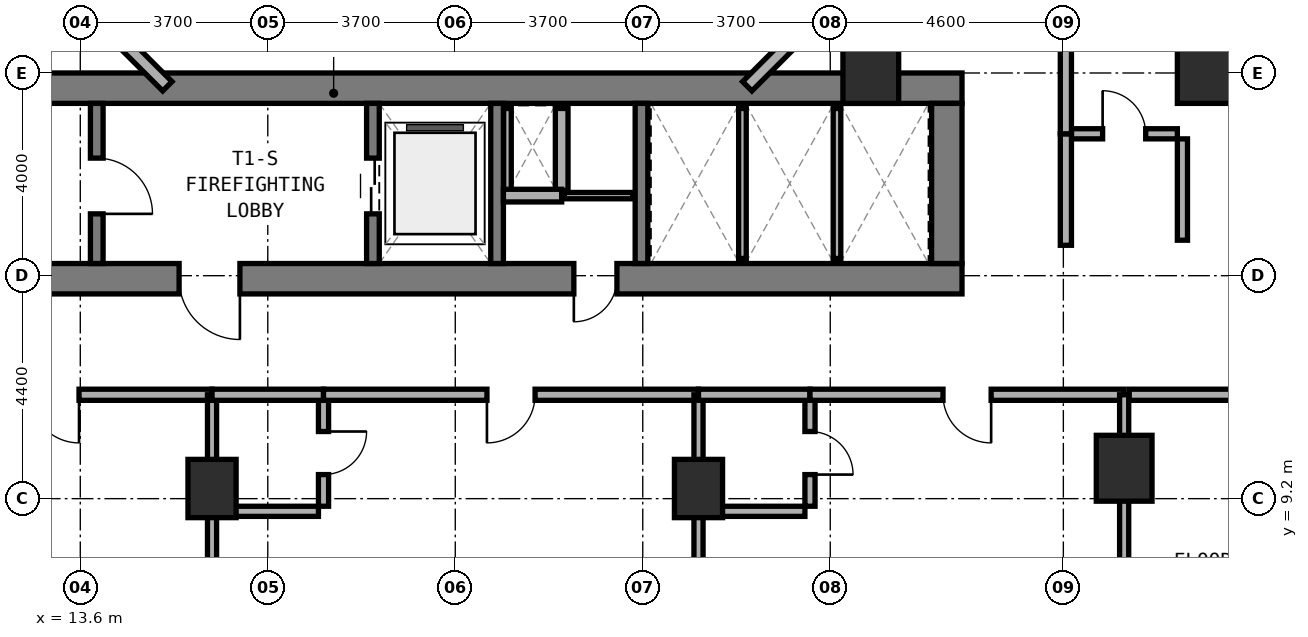
"""IFC4 building model, lengths in metres.
Left out: names, types, materials, properties, quantities, classifications, styles, units other than length and angle.
Written with IfcOpenShell. Run it as: python <this file> out.ifc"""

import sys

from ifc_helpers import new_model, si_unit, direction, frame, frame_2d, origin, origin_2d, place, context, subcontext, project, spatial, rectangle, extrude, element, fill, save


model = new_model("IFC4")
c1 = context("Model", 3, precision=1e-05, world=origin(), true_north=direction((0.0, 1.0)))
c2 = subcontext(c1, "Body", "Model", "MODEL_VIEW")
j1 = project(units=[si_unit("LENGTHUNIT", "METRE"), si_unit("PLANEANGLEUNIT", "RADIAN")], contexts=[c1])
p1 = place(None, origin())
s1 = spatial("IfcSite", under=j1, at=p1, CompositionType="ELEMENT")
p2 = place(p1, origin())
s2 = spatial("IfcBuilding", under=s1, at=p2, CompositionType="ELEMENT")
p3 = place(p2, frame((0.0, 0.0, 31.0)))
s3 = spatial("IfcBuildingStorey", under=s2, at=p3, CompositionType="ELEMENT", Elevation=31.0)
p4 = place(p3, frame((6.2, 13.54, 0.0), z_axis=(0.0, 0.0, 1.0), x_axis=(1.0, 0.0, 0.0)))
e1 = element("IfcWall", 1, at=p4, inside=s3, PredefinedType="SHEAR", context=c2, shape_type="SweptSolid", body=[
    extrude(rectangle(XDim=24.8, YDim=0.6, at=frame_2d((12.4, 0.0))), origin(), (0.0, 0.0, 1.0), 3.5),
])
p5 = place(p4, frame((9.35, 0.0, 0.0)))
e2 = element("IfcOpeningElement", 2, at=p5, cuts=e1, PredefinedType="OPENING", context=c2, shape_type="SweptSolid", body=[
    extrude(rectangle(XDim=1.2, YDim=2.15, at=frame_2d((0.6, 1.075))), frame((0.0, 0.31, 0.0), z_axis=(0.0, -1.0, 0.0), x_axis=(1.0, 0.0, 0.0)), (0.0, 0.0, 1.0), 0.62),
])
p6 = place(p4, frame((17.14, 0.0, 0.0)))
e3 = element("IfcOpeningElement", 3, at=p6, cuts=e1, PredefinedType="OPENING", context=c2, shape_type="SweptSolid", body=[
    extrude(rectangle(XDim=0.85, YDim=2.1, at=frame_2d((0.425, 1.05))), frame((0.0, 0.31, 0.0), z_axis=(0.0, -1.0, 0.0), x_axis=(1.0, 0.0, 0.0)), (0.0, 0.0, 1.0), 0.62),
])
p7 = place(p3, frame((6.2, 17.3, 0.0), z_axis=(0.0, 0.0, 1.0), x_axis=(1.0, 0.0, 0.0)))
e4 = element("IfcWall", 4, at=p7, inside=s3, PredefinedType="SHEAR", context=c2, shape_type="SweptSolid", body=[
    extrude(rectangle(XDim=24.8, YDim=0.6, at=frame_2d((12.4, 0.0))), origin(), (0.0, 0.0, 1.0), 3.5),
])
p8 = place(p3, frame((30.7, 13.84, 0.0), z_axis=(0.0, 0.0, 1.0), x_axis=(0.0, 1.0, 0.0)))
e5 = element("IfcWall", 5, at=p8, inside=s3, PredefinedType="SHEAR", context=c2, shape_type="SweptSolid", body=[
    extrude(rectangle(XDim=3.16, YDim=0.6, at=frame_2d((1.58, 0.0))), origin(), (0.0, 0.0, 1.0), 3.5),
])
p9 = place(p3, frame((13.925, 13.84, 0.0), z_axis=(0.0, 0.0, 1.0), x_axis=(0.0, 1.0, 0.0)))
e6 = element("IfcWall", 6, at=p9, inside=s3, PredefinedType="STANDARD", context=c2, shape_type="SweptSolid", body=[
    extrude(rectangle(XDim=3.16, YDim=0.25, at=frame_2d((1.58, 0.0))), origin(), (0.0, 0.0, 1.0), 3.22),
])
p10 = place(p9, frame((0.98, 0.0, 0.0)))
e7 = element("IfcOpeningElement", 7, at=p10, cuts=e6, PredefinedType="OPENING", context=c2, shape_type="SweptSolid", body=[
    extrude(rectangle(XDim=1.1, YDim=2.15, at=frame_2d((0.55, 1.075))), frame((0.0, 0.135, 0.0), z_axis=(0.0, -1.0, 0.0), x_axis=(1.0, 0.0, 0.0)), (0.0, 0.0, 1.0), 0.27),
])
p11 = place(p3, frame((19.375, 13.84, 0.0), z_axis=(0.0, 0.0, 1.0), x_axis=(0.0, 1.0, 0.0)))
e8 = element("IfcWall", 8, at=p11, inside=s3, PredefinedType="STANDARD", context=c2, shape_type="SweptSolid", body=[
    extrude(rectangle(XDim=3.16, YDim=0.25, at=frame_2d((1.58, 0.0))), origin(), (0.0, 0.0, 1.0), 3.22),
])
p12 = place(p11, frame((0.98, 0.0, 0.0)))
e9 = element("IfcOpeningElement", 9, at=p12, cuts=e8, PredefinedType="OPENING", context=c2, shape_type="SweptSolid", body=[
    extrude(rectangle(XDim=1.1, YDim=2.15, at=frame_2d((0.55, 1.075))), frame((0.0, 0.135, 0.0), z_axis=(0.0, -1.0, 0.0), x_axis=(1.0, 0.0, 0.0)), (0.0, 0.0, 1.0), 0.27),
])
for number, where, z_axis, x_axis in (
    (10, (21.825, 13.84, 0.0), (0.0, 0.0, 1.0), (0.0, 1.0, 0.0)),
    (11, (24.675, 13.84, 0.0), (0.0, 0.0, 1.0), (0.0, 1.0, 0.0)),
):
    element("IfcWall", number, at=place(p3, frame(where, z_axis=z_axis, x_axis=x_axis)), inside=s3, PredefinedType="STANDARD", context=c2, shape_type="SweptSolid", body=[
        extrude(rectangle(XDim=3.16, YDim=0.25, at=frame_2d((1.58, 0.0))), origin(), (0.0, 0.0, 1.0), 3.22),
    ])
for number, where, z_axis, x_axis in (
    (12, (16.2, 9.4, 0.0), (0.0, 0.0, 1.0), (1.0, 0.0, 0.0)),
    (13, (25.8, 9.4, 0.0), (0.0, 0.0, 1.0), (1.0, 0.0, 0.0)),
):
    element("IfcColumn", number, at=place(p3, frame(where, z_axis=z_axis, x_axis=x_axis)), inside=s3, PredefinedType="COLUMN", context=c2, shape_type="SweptSolid", body=[
        extrude(rectangle(XDim=0.95, YDim=1.15, at=origin_2d()), origin(), (0.0, 0.0, 1.0), 3.5),
    ])
for number, where, z_axis, x_axis in (
    (14, (34.2, 9.8, 0.0), (0.0, 0.0, 1.0), (1.0, 0.0, 0.0)),
    (15, (35.8, 17.65, 0.0), (0.0, 0.0, 1.0), (1.0, 0.0, 0.0)),
    (16, (29.2, 17.65, 0.0), (0.0, 0.0, 1.0), (1.0, 0.0, 0.0)),
):
    element("IfcColumn", number, at=place(p3, frame(where, z_axis=z_axis, x_axis=x_axis)), inside=s3, PredefinedType="COLUMN", context=c2, shape_type="SweptSolid", body=[
        extrude(rectangle(XDim=1.1, YDim=1.3, at=origin_2d()), origin(), (0.0, 0.0, 1.0), 3.5),
    ])
p13 = place(p3, frame((26.762, 17.338, 0.0), z_axis=(0.0, 0.0, 1.0), x_axis=(0.707059717605, 0.707153841636, 0.0)))
e17 = element("IfcWall", 17, at=p13, inside=s3, PredefinedType="STANDARD", context=c2, shape_type="SweptSolid", body=[
    extrude(rectangle(XDim=2.594, YDim=0.26, at=frame_2d((1.297, 0.0))), origin(), (0.0, 0.0, 1.0), 3.22),
])
p14 = place(p3, frame((13.484, 19.172, 0.0), z_axis=(0.0, 0.0, 1.0), x_axis=(0.707106781187, -0.707106781187, 0.0)))
e18 = element("IfcWall", 18, at=p14, inside=s3, PredefinedType="STANDARD", context=c2, shape_type="SweptSolid", body=[
    extrude(rectangle(XDim=2.594, YDim=0.26, at=frame_2d((1.297, 0.0))), origin(), (0.0, 0.0, 1.0), 3.22),
])
p15 = place(p3, frame((22.03, 15.28, 0.0), z_axis=(0.0, 0.0, 1.0), x_axis=(0.0, 1.0, 0.0)))
e19 = element("IfcWall", 19, at=p15, inside=s3, PredefinedType="PARTITIONING", context=c2, shape_type="SweptSolid", body=[
    extrude(rectangle(XDim=1.62, YDim=0.15, at=frame_2d((0.81, 0.0))), origin(), (0.0, 0.0, 1.0), 3.22),
])
p16 = place(p3, frame((23.1, 15.28, 0.0), z_axis=(0.0, 0.0, 1.0), x_axis=(0.0, 1.0, 0.0)))
e20 = element("IfcWall", 20, at=p16, inside=s3, PredefinedType="SOLIDWALL", context=c2, shape_type="SweptSolid", body=[
    extrude(rectangle(XDim=1.62, YDim=0.25, at=frame_2d((0.81, 0.0))), origin(), (0.0, 0.0, 1.0), 3.22),
])
p17 = place(p3, frame((21.95, 15.18, 0.0), z_axis=(0.0, 0.0, 1.0), x_axis=(1.0, 0.0, 0.0)))
e21 = element("IfcWall", 21, at=p17, inside=s3, PredefinedType="SOLIDWALL", context=c2, shape_type="SweptSolid", body=[
    extrude(rectangle(XDim=1.15, YDim=0.25, at=frame_2d((0.575, 0.0))), origin(), (0.0, 0.0, 1.0), 3.22),
])
p18 = place(p3, frame((23.15, 15.18, 0.0), z_axis=(0.0, 0.0, 1.0), x_axis=(1.0, 0.0, 0.0)))
e22 = element("IfcWall", 22, at=p18, inside=s3, PredefinedType="PARTITIONING", context=c2, shape_type="SweptSolid", body=[
    extrude(rectangle(XDim=1.35, YDim=0.125, at=frame_2d((0.675, 0.0))), origin(), (0.0, 0.0, 1.0), 3.22),
])
p19 = place(p3, frame((26.667, 13.94, 0.0), z_axis=(0.0, 0.0, 1.0), x_axis=(0.0, 1.0, 0.0)))
e23 = element("IfcWall", 23, at=p19, inside=s3, PredefinedType="PARTITIONING", context=c2, shape_type="SweptSolid", body=[
    extrude(rectangle(XDim=2.96, YDim=0.15, at=frame_2d((1.48, 0.0))), origin(), (0.0, 0.0, 1.0), 3.22),
])
p20 = place(p3, frame((28.533, 13.94, 0.0), z_axis=(0.0, 0.0, 1.0), x_axis=(0.0, 1.0, 0.0)))
e24 = element("IfcWall", 24, at=p20, inside=s3, PredefinedType="PARTITIONING", context=c2, shape_type="SweptSolid", body=[
    extrude(rectangle(XDim=2.96, YDim=0.15, at=frame_2d((1.48, 0.0))), origin(), (0.0, 0.0, 1.0), 2.395),
])
p21 = place(p3, frame((10.0, 11.25, 0.0), z_axis=(0.0, 0.0, 1.0), x_axis=(1.0, 0.0, 0.0)))
e25 = element("IfcWall", 25, at=p21, inside=s3, PredefinedType="SOLIDWALL", context=c2, shape_type="SweptSolid", body=[
    extrude(rectangle(XDim=6.2, YDim=0.22, at=frame_2d((3.1, 0.0))), origin(), (0.0, 0.0, 1.0), 2.395),
])
p22 = place(p21, frame((2.625, 0.0, 0.0)))
e26 = element("IfcOpeningElement", 26, at=p22, cuts=e25, PredefinedType="OPENING", context=c2, shape_type="SweptSolid", body=[
    extrude(rectangle(XDim=0.95, YDim=2.1, at=frame_2d((0.475, 1.05))), frame((0.0, 0.12, 0.0), z_axis=(0.0, -1.0, 0.0), x_axis=(1.0, 0.0, 0.0)), (0.0, 0.0, 1.0), 0.24),
])
p23 = place(p3, frame((16.2, 3.06, 0.0), z_axis=(0.0, 0.0, 1.0), x_axis=(0.0, 1.0, 0.0)))
e27 = element("IfcWall", 27, at=p23, inside=s3, PredefinedType="SOLIDWALL", context=c2, shape_type="SweptSolid", body=[
    extrude(rectangle(XDim=8.19, YDim=0.18, at=frame_2d((4.095, 0.0))), origin(), (0.0, 0.0, 1.0), 2.395),
])
p24 = place(p3, frame((18.4, 9.05, 0.0), z_axis=(0.0, 0.0, 1.0), x_axis=(0.0, 1.0, 0.0)))
e28 = element("IfcWall", 28, at=p24, inside=s3, PredefinedType="PLUMBINGWALL", context=c2, shape_type="SweptSolid", body=[
    extrude(rectangle(XDim=2.1, YDim=0.2, at=frame_2d((1.05, 0.0))), origin(), (0.0, 0.0, 1.0), 2.745),
])
p25 = place(p24, frame((0.625, 0.0, 0.0)))
e29 = element("IfcOpeningElement", 29, at=p25, cuts=e28, PredefinedType="OPENING", context=c2, shape_type="SweptSolid", body=[
    extrude(rectangle(XDim=0.85, YDim=2.1, at=frame_2d((0.425, 1.05))), frame((0.0, 0.11, 0.0), z_axis=(0.0, -1.0, 0.0), x_axis=(1.0, 0.0, 0.0)), (0.0, 0.0, 1.0), 0.22),
])
p26 = place(p3, frame((16.3, 8.95, 0.0), z_axis=(0.0, 0.0, 1.0), x_axis=(1.0, 0.0, 0.0)))
e30 = element("IfcWall", 30, at=p26, inside=s3, PredefinedType="PLUMBINGWALL", context=c2, shape_type="SweptSolid", body=[
    extrude(rectangle(XDim=2.0, YDim=0.2, at=frame_2d((1.0, 0.0))), origin(), (0.0, 0.0, 1.0), 3.22),
])
p27 = place(p3, frame((16.2, 11.25, 0.0), z_axis=(0.0, 0.0, 1.0), x_axis=(1.0, 0.0, 0.0)))
e31 = element("IfcWall", 31, at=p27, inside=s3, PredefinedType="SOLIDWALL", context=c2, shape_type="SweptSolid", body=[
    extrude(rectangle(XDim=2.2, YDim=0.22, at=frame_2d((1.1, 0.0))), origin(), (0.0, 0.0, 1.0), 2.395),
])
p28 = place(p3, frame((18.4, 11.25, 0.0), z_axis=(0.0, 0.0, 1.0), x_axis=(1.0, 0.0, 0.0)))
e32 = element("IfcWall", 32, at=p28, inside=s3, PredefinedType="SOLIDWALL", context=c2, shape_type="SweptSolid", body=[
    extrude(rectangle(XDim=7.4, YDim=0.22, at=frame_2d((3.7, 0.0))), origin(), (0.0, 0.0, 1.0), 2.395),
])
p29 = place(p28, frame((3.225, 0.0, 0.0)))
e33 = element("IfcOpeningElement", 33, at=p29, cuts=e32, PredefinedType="OPENING", context=c2, shape_type="SweptSolid", body=[
    extrude(rectangle(XDim=0.95, YDim=2.1, at=frame_2d((0.475, 1.05))), frame((0.0, 0.12, 0.0), z_axis=(0.0, -1.0, 0.0), x_axis=(1.0, 0.0, 0.0)), (0.0, 0.0, 1.0), 0.24),
])
p30 = place(p3, frame((25.8, 3.06, 0.0), z_axis=(0.0, 0.0, 1.0), x_axis=(0.0, 1.0, 0.0)))
e34 = element("IfcWall", 34, at=p30, inside=s3, PredefinedType="SOLIDWALL", context=c2, shape_type="SweptSolid", body=[
    extrude(rectangle(XDim=8.19, YDim=0.18, at=frame_2d((4.095, 0.0))), origin(), (0.0, 0.0, 1.0), 2.395),
])
p31 = place(p3, frame((28.0, 9.05, 0.0), z_axis=(0.0, 0.0, 1.0), x_axis=(0.0, 1.0, 0.0)))
e35 = element("IfcWall", 35, at=p31, inside=s3, PredefinedType="PLUMBINGWALL", context=c2, shape_type="SweptSolid", body=[
    extrude(rectangle(XDim=2.1, YDim=0.2, at=frame_2d((1.05, 0.0))), origin(), (0.0, 0.0, 1.0), 2.745),
])
p32 = place(p31, frame((0.625, 0.0, 0.0)))
e36 = element("IfcOpeningElement", 36, at=p32, cuts=e35, PredefinedType="OPENING", context=c2, shape_type="SweptSolid", body=[
    extrude(rectangle(XDim=0.85, YDim=2.1, at=frame_2d((0.425, 1.05))), frame((0.0, 0.11, 0.0), z_axis=(0.0, -1.0, 0.0), x_axis=(1.0, 0.0, 0.0)), (0.0, 0.0, 1.0), 0.22),
])
p33 = place(p3, frame((25.9, 8.95, 0.0), z_axis=(0.0, 0.0, 1.0), x_axis=(1.0, 0.0, 0.0)))
e37 = element("IfcWall", 37, at=p33, inside=s3, PredefinedType="PLUMBINGWALL", context=c2, shape_type="SweptSolid", body=[
    extrude(rectangle(XDim=2.0, YDim=0.2, at=frame_2d((1.0, 0.0))), origin(), (0.0, 0.0, 1.0), 3.22),
])
p34 = place(p3, frame((25.8, 11.25, 0.0), z_axis=(0.0, 0.0, 1.0), x_axis=(1.0, 0.0, 0.0)))
e38 = element("IfcWall", 38, at=p34, inside=s3, PredefinedType="SOLIDWALL", context=c2, shape_type="SweptSolid", body=[
    extrude(rectangle(XDim=2.2, YDim=0.22, at=frame_2d((1.1, 0.0))), origin(), (0.0, 0.0, 1.0), 2.395),
])
p35 = place(p3, frame((28.0, 11.25, 0.0), z_axis=(0.0, 0.0, 1.0), x_axis=(1.0, 0.0, 0.0)))
e39 = element("IfcWall", 39, at=p35, inside=s3, PredefinedType="SOLIDWALL", context=c2, shape_type="SweptSolid", body=[
    extrude(rectangle(XDim=6.2, YDim=0.22, at=frame_2d((3.1, 0.0))), origin(), (0.0, 0.0, 1.0), 2.395),
])
p36 = place(p35, frame((2.625, 0.0, 0.0)))
e40 = element("IfcOpeningElement", 40, at=p36, cuts=e39, PredefinedType="OPENING", context=c2, shape_type="SweptSolid", body=[
    extrude(rectangle(XDim=0.95, YDim=2.1, at=frame_2d((0.475, 1.05))), frame((0.0, 0.12, 0.0), z_axis=(0.0, -1.0, 0.0), x_axis=(1.0, 0.0, 0.0)), (0.0, 0.0, 1.0), 0.24),
])
p37 = place(p3, frame((34.2, 4.576, 0.0), z_axis=(0.0, 0.0, 1.0), x_axis=(0.0, 1.0, 0.0)))
e41 = element("IfcWall", 41, at=p37, inside=s3, PredefinedType="SOLIDWALL", context=c2, shape_type="SweptSolid", body=[
    extrude(rectangle(XDim=6.674, YDim=0.18, at=frame_2d((3.337, 0.0))), origin(), (0.0, 0.0, 1.0), 2.395),
])
p38 = place(p3, frame((34.3, 11.25, 0.0), z_axis=(0.0, 0.0, 1.0), x_axis=(1.0, 0.0, 0.0)))
e42 = element("IfcWall", 42, at=p38, inside=s3, PredefinedType="SOLIDWALL", context=c2, shape_type="SweptSolid", body=[
    extrude(rectangle(XDim=7.44, YDim=0.22, at=frame_2d((3.72, 0.0))), origin(), (0.0, 0.0, 1.0), 2.745),
])
p39 = place(p38, frame((2.911, 0.0, 0.0)))
e43 = element("IfcOpeningElement", 43, at=p39, cuts=e42, PredefinedType="OPENING", context=c2, shape_type="SweptSolid", body=[
    extrude(rectangle(XDim=0.95, YDim=2.1, at=frame_2d((0.475, 1.05))), frame((0.0, 0.12, 0.0), z_axis=(0.0, -1.0, 0.0), x_axis=(1.0, 0.0, 0.0)), (0.0, 0.0, 1.0), 0.24),
])
p40 = place(p3, frame((33.15, 16.4, 0.0), z_axis=(0.0, 0.0, 1.0), x_axis=(1.0, 0.0, 0.0)))
e44 = element("IfcWall", 44, at=p40, inside=s3, PredefinedType="PLUMBINGWALL", context=c2, shape_type="SweptSolid", body=[
    extrude(rectangle(XDim=2.1, YDim=0.2, at=frame_2d((1.05, 0.0))), origin(), (0.0, 0.0, 1.0), 3.22),
])
p41 = place(p40, frame((0.625, 0.0, 0.0)))
e45 = element("IfcOpeningElement", 45, at=p41, cuts=e44, PredefinedType="OPENING", context=c2, shape_type="SweptSolid", body=[
    extrude(rectangle(XDim=0.85, YDim=2.1, at=frame_2d((0.425, 1.05))), frame((0.0, 0.11, 0.0), z_axis=(0.0, -1.0, 0.0), x_axis=(1.0, 0.0, 0.0)), (0.0, 0.0, 1.0), 0.22),
])
p42 = place(p3, frame((35.35, 14.3, 0.0), z_axis=(0.0, 0.0, 1.0), x_axis=(0.0, 1.0, 0.0)))
e46 = element("IfcWall", 46, at=p42, inside=s3, PredefinedType="PLUMBINGWALL", context=c2, shape_type="SweptSolid", body=[
    extrude(rectangle(XDim=2.0, YDim=0.2, at=frame_2d((1.0, 0.0))), origin(), (0.0, 0.0, 1.0), 2.745),
])
p43 = place(p3, frame((33.05, 14.2, 0.0), z_axis=(0.0, 0.0, 1.0), x_axis=(0.0, 1.0, 0.0)))
e47 = element("IfcWall", 47, at=p43, inside=s3, PredefinedType="SOLIDWALL", context=c2, shape_type="SweptSolid", body=[
    extrude(rectangle(XDim=2.2, YDim=0.22, at=frame_2d((1.1, 0.0))), origin(), (0.0, 0.0, 1.0), 3.22),
])
p44 = place(p3, frame((33.05, 16.4, 0.0), z_axis=(0.0, 0.0, 1.0), x_axis=(0.0, 1.0, 0.0)))
e48 = element("IfcWall", 48, at=p44, inside=s3, PredefinedType="SOLIDWALL", context=c2, shape_type="SweptSolid", body=[
    extrude(rectangle(XDim=6.134, YDim=0.22, at=frame_2d((3.067, 0.0))), origin(), (0.0, 0.0, 1.0), 2.395),
])
p45 = place(p44, frame((2.592, 0.0, 0.0)))
e49 = element("IfcOpeningElement", 49, at=p45, cuts=e48, PredefinedType="OPENING", context=c2, shape_type="SweptSolid", body=[
    extrude(rectangle(XDim=0.95, YDim=2.1, at=frame_2d((0.475, 1.05))), frame((0.0, 0.12, 0.0), z_axis=(0.0, -1.0, 0.0), x_axis=(1.0, 0.0, 0.0)), (0.0, 0.0, 1.0), 0.24),
])
p46 = place(p10, frame((1.1, 0.0, 0.0), z_axis=(0.0, 0.0, 1.0), x_axis=(-1.0, 0.0, 0.0)))
e50 = element("IfcDoor", 50, at=p46, inside=s3, OperationType="SINGLE_SWING_RIGHT", PredefinedType="DOOR", context=c2, shape_type="SweptSolid", body=[
    extrude(rectangle(XDim=1.1, YDim=2.15, at=frame_2d((0.55, 1.075))), frame((0.0, 0.025, 0.0), z_axis=(0.0, -1.0, 0.0), x_axis=(1.0, 0.0, 0.0)), (0.0, 0.0, 1.0), 0.05),
])
fill(e7, e50)
p47 = place(p5, frame((1.2, 0.0, 0.0), z_axis=(0.0, 0.0, 1.0), x_axis=(-1.0, 0.0, 0.0)))
e51 = element("IfcDoor", 51, at=p47, inside=s3, OperationType="SINGLE_SWING_LEFT", PredefinedType="DOOR", context=c2, shape_type="SweptSolid", body=[
    extrude(rectangle(XDim=1.2, YDim=2.15, at=frame_2d((0.6, 1.075))), frame((0.0, 0.025, 0.0), z_axis=(0.0, -1.0, 0.0), x_axis=(1.0, 0.0, 0.0)), (0.0, 0.0, 1.0), 0.05),
])
fill(e2, e51)
p48 = place(p12, origin())
e52 = element("IfcDoor", 52, at=p48, inside=s3, OperationType="DOUBLE_DOOR_SLIDING", PredefinedType="DOOR", context=c2, shape_type="SweptSolid", body=[
    extrude(rectangle(XDim=1.1, YDim=2.15, at=frame_2d((0.55, 1.075))), frame((0.0, 0.025, 0.0), z_axis=(0.0, -1.0, 0.0), x_axis=(1.0, 0.0, 0.0)), (0.0, 0.0, 1.0), 0.05),
])
fill(e9, e52)
p49 = place(p6, frame((0.85, 0.0, 0.0), z_axis=(0.0, 0.0, 1.0), x_axis=(-1.0, 0.0, 0.0)))
e53 = element("IfcDoor", 53, at=p49, inside=s3, OperationType="SINGLE_SWING_RIGHT", PredefinedType="DOOR", context=c2, shape_type="SweptSolid", body=[
    extrude(rectangle(XDim=0.85, YDim=2.1, at=frame_2d((0.425, 1.05))), frame((0.0, 0.025, 0.0), z_axis=(0.0, -1.0, 0.0), x_axis=(1.0, 0.0, 0.0)), (0.0, 0.0, 1.0), 0.05),
])
fill(e3, e53)
p50 = place(p22, frame((0.95, 0.0, 0.0), z_axis=(0.0, 0.0, 1.0), x_axis=(-1.0, 0.0, 0.0)))
e54 = element("IfcDoor", 54, at=p50, inside=s3, OperationType="SINGLE_SWING_LEFT", PredefinedType="DOOR", context=c2, shape_type="SweptSolid", body=[
    extrude(rectangle(XDim=0.95, YDim=2.1, at=frame_2d((0.475, 1.05))), frame((0.0, 0.025, 0.0), z_axis=(0.0, -1.0, 0.0), x_axis=(1.0, 0.0, 0.0)), (0.0, 0.0, 1.0), 0.05),
])
fill(e26, e54)
p51 = place(p25, frame((0.85, 0.0, 0.0), z_axis=(0.0, 0.0, 1.0), x_axis=(-1.0, 0.0, 0.0)))
e55 = element("IfcDoor", 55, at=p51, inside=s3, OperationType="SINGLE_SWING_LEFT", PredefinedType="DOOR", context=c2, shape_type="SweptSolid", body=[
    extrude(rectangle(XDim=0.85, YDim=2.1, at=frame_2d((0.425, 1.05))), frame((0.0, 0.025, 0.0), z_axis=(0.0, -1.0, 0.0), x_axis=(1.0, 0.0, 0.0)), (0.0, 0.0, 1.0), 0.05),
])
fill(e29, e55)
p52 = place(p29, frame((0.95, 0.0, 0.0), z_axis=(0.0, 0.0, 1.0), x_axis=(-1.0, 0.0, 0.0)))
e56 = element("IfcDoor", 56, at=p52, inside=s3, OperationType="SINGLE_SWING_RIGHT", PredefinedType="DOOR", context=c2, shape_type="SweptSolid", body=[
    extrude(rectangle(XDim=0.95, YDim=2.1, at=frame_2d((0.475, 1.05))), frame((0.0, 0.025, 0.0), z_axis=(0.0, -1.0, 0.0), x_axis=(1.0, 0.0, 0.0)), (0.0, 0.0, 1.0), 0.05),
])
fill(e33, e56)
p53 = place(p32, frame((0.85, 0.0, 0.0), z_axis=(0.0, 0.0, 1.0), x_axis=(-1.0, 0.0, 0.0)))
e57 = element("IfcDoor", 57, at=p53, inside=s3, OperationType="SINGLE_SWING_RIGHT", PredefinedType="DOOR", context=c2, shape_type="SweptSolid", body=[
    extrude(rectangle(XDim=0.85, YDim=2.1, at=frame_2d((0.425, 1.05))), frame((0.0, 0.025, 0.0), z_axis=(0.0, -1.0, 0.0), x_axis=(1.0, 0.0, 0.0)), (0.0, 0.0, 1.0), 0.05),
])
fill(e36, e57)
p54 = place(p36, frame((0.95, 0.0, 0.0), z_axis=(0.0, 0.0, 1.0), x_axis=(-1.0, 0.0, 0.0)))
e58 = element("IfcDoor", 58, at=p54, inside=s3, OperationType="SINGLE_SWING_LEFT", PredefinedType="DOOR", context=c2, shape_type="SweptSolid", body=[
    extrude(rectangle(XDim=0.95, YDim=2.1, at=frame_2d((0.475, 1.05))), frame((0.0, 0.025, 0.0), z_axis=(0.0, -1.0, 0.0), x_axis=(1.0, 0.0, 0.0)), (0.0, 0.0, 1.0), 0.05),
])
fill(e40, e58)
p55 = place(p41, origin())
e59 = element("IfcDoor", 59, at=p55, inside=s3, OperationType="SINGLE_SWING_LEFT", PredefinedType="DOOR", context=c2, shape_type="SweptSolid", body=[
    extrude(rectangle(XDim=0.85, YDim=2.1, at=frame_2d((0.425, 1.05))), frame((0.0, 0.025, 0.0), z_axis=(0.0, -1.0, 0.0), x_axis=(1.0, 0.0, 0.0)), (0.0, 0.0, 1.0), 0.05),
])
fill(e45, e59)
save(model, sys.argv[1])
